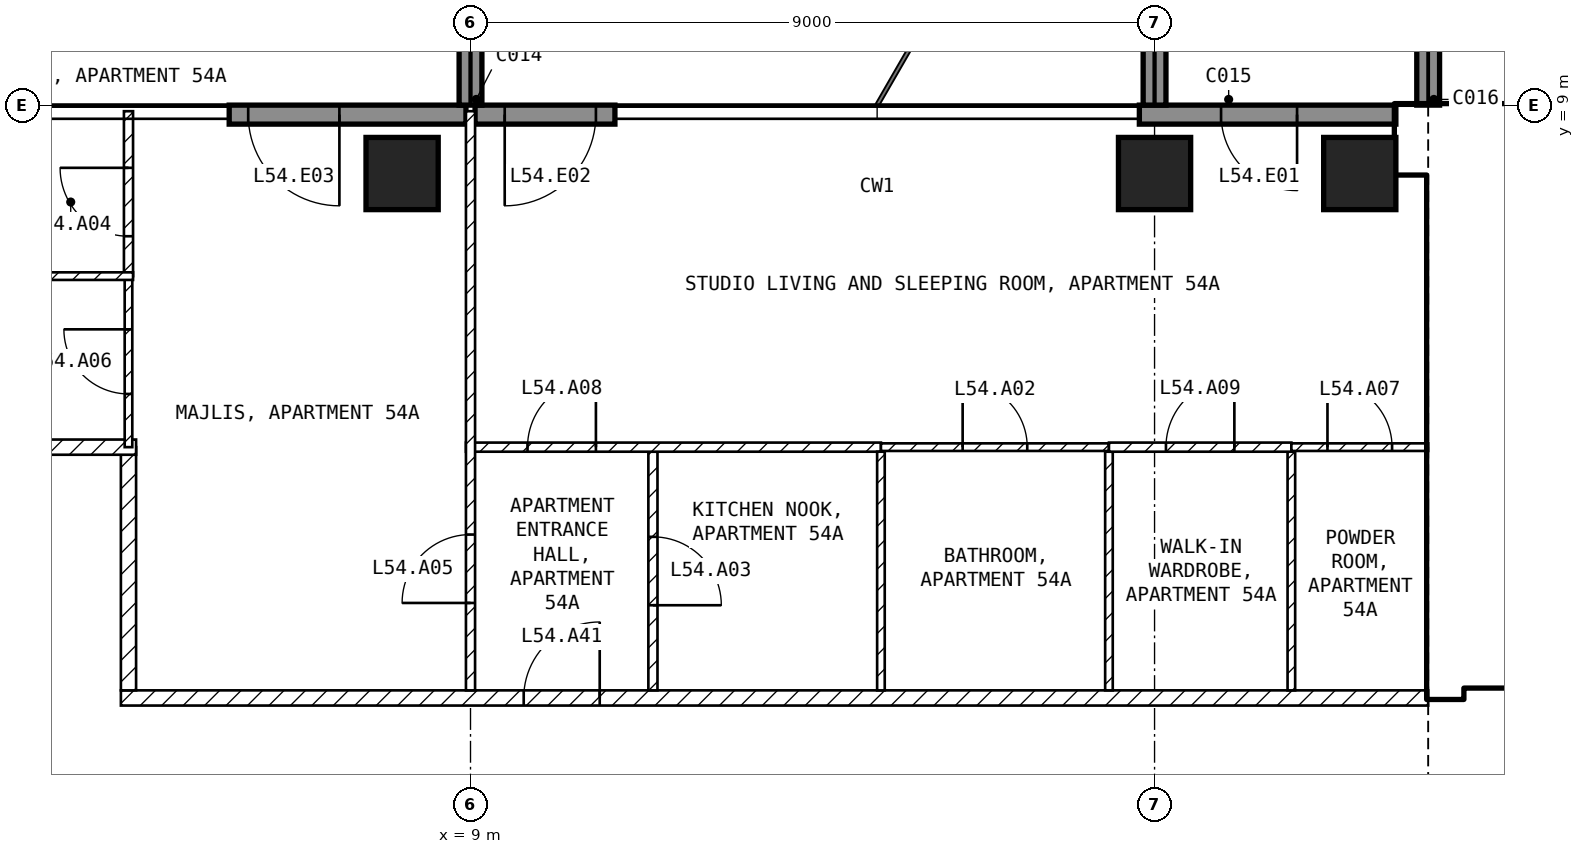
"""IFC4 building model, lengths in metres.
Left out: names, types, materials, properties, quantities, classifications, styles, units other than length and angle.
Written with IfcOpenShell. Run it as: python <this file> out.ifc"""

import sys

from ifc_helpers import new_model, si_unit, direction, frame, frame_2d, origin, origin_2d, place, context, subcontext, project, spatial, rectangle, extrude, element, fill, save


model = new_model("IFC4")
c1 = context("Model", 3, precision=1e-05, world=origin(), true_north=direction((0.0, 1.0)))
c2 = subcontext(c1, "Body", "Model", "MODEL_VIEW")
j1 = project(units=[si_unit("LENGTHUNIT", "METRE"), si_unit("PLANEANGLEUNIT", "RADIAN")], contexts=[c1])
p1 = place(None, origin())
s1 = spatial("IfcSite", under=j1, at=p1, CompositionType="ELEMENT")
p2 = place(p1, origin())
s2 = spatial("IfcBuilding", under=s1, at=p2, CompositionType="ELEMENT")
p3 = place(p2, frame((0.0, 0.0, 215.6)))
s3 = spatial("IfcBuildingStorey", under=s2, at=p3, CompositionType="ELEMENT", Elevation=215.6)
for number, where, z_axis, x_axis in (
    (1, (8.1, 8.1, -0.25), (0.0, 0.0, 1.0), (1.0, 0.0, 0.0)),
    (2, (18.0, 8.1, -0.25), (0.0, 0.0, 1.0), (1.0, 0.0, 0.0)),
    (3, (20.7, 8.1, -0.25), (0.0, 0.0, 1.0), (1.0, 0.0, 0.0)),
):
    element("IfcColumn", number, at=place(p3, frame(where, z_axis=z_axis, x_axis=x_axis)), inside=s3, PredefinedType="COLUMN", context=c2, shape_type="SweptSolid", body=[
        extrude(rectangle(XDim=0.95, YDim=0.95, at=origin_2d()), origin(), (0.0, 0.0, 1.0), 3.5),
    ])
p4 = place(p3, frame((21.175, 8.875, 0.0), z_axis=(0.0, 0.0, 1.0), x_axis=(-1.0, 0.0, 0.0)))
e4 = element("IfcWall", 4, at=p4, inside=s3, PredefinedType="SOLIDWALL", context=c2, shape_type="SweptSolid", body=[
    extrude(rectangle(XDim=3.375, YDim=0.25, at=frame_2d((1.688, 0.0))), origin(), (0.0, 0.0, 1.0), 3.25),
])
p5 = place(p4, frame((1.3, 0.0, 0.0)))
e5 = element("IfcOpeningElement", 5, at=p5, cuts=e4, PredefinedType="OPENING", context=c2, shape_type="SweptSolid", body=[
    extrude(rectangle(XDim=1.0, YDim=2.4, at=frame_2d((0.5, 1.2))), frame((0.0, 0.135, 0.0), z_axis=(0.0, -1.0, 0.0), x_axis=(1.0, 0.0, 0.0)), (0.0, 0.0, 1.0), 0.27),
])
p6 = place(p3, frame((10.9, 8.875, 0.0), z_axis=(0.0, 0.0, 1.0), x_axis=(-1.0, 0.0, 0.0)))
e6 = element("IfcWall", 6, at=p6, inside=s3, PredefinedType="SOLIDWALL", context=c2, shape_type="SweptSolid", body=[
    extrude(rectangle(XDim=1.84, YDim=0.25, at=frame_2d((0.92, 0.0))), origin(), (0.0, 0.0, 1.0), 3.25),
])
p7 = place(p6, frame((0.25, 0.0, 0.0)))
e7 = element("IfcOpeningElement", 7, at=p7, cuts=e6, PredefinedType="OPENING", context=c2, shape_type="SweptSolid", body=[
    extrude(rectangle(XDim=1.2, YDim=2.4, at=frame_2d((0.6, 1.2))), frame((0.0, 0.135, 0.0), z_axis=(0.0, -1.0, 0.0), x_axis=(1.0, 0.0, 0.0)), (0.0, 0.0, 1.0), 0.27),
])
p8 = place(p3, frame((8.94, 8.875, 0.0), z_axis=(0.0, 0.0, 1.0), x_axis=(-1.0, 0.0, 0.0)))
e8 = element("IfcWall", 8, at=p8, inside=s3, PredefinedType="SOLIDWALL", context=c2, shape_type="SweptSolid", body=[
    extrude(rectangle(XDim=3.115, YDim=0.25, at=frame_2d((1.558, 0.0))), origin(), (0.0, 0.0, 1.0), 3.25),
])
p9 = place(p8, frame((1.665, 0.0, 0.0)))
e9 = element("IfcOpeningElement", 9, at=p9, cuts=e8, PredefinedType="OPENING", context=c2, shape_type="SweptSolid", body=[
    extrude(rectangle(XDim=1.2, YDim=2.4, at=frame_2d((0.6, 1.2))), frame((0.0, 0.135, 0.0), z_axis=(0.0, -1.0, 0.0), x_axis=(1.0, 0.0, 0.0)), (0.0, 0.0, 1.0), 0.27),
])
for number, where, z_axis, x_axis in (
    (10, (9.0, 9.0, 0.0), (0.0, 0.0, 1.0), (0.0, 1.0, 0.0)),
    (11, (18.0, 9.0, 0.0), (0.0, 0.0, 1.0), (0.0, 1.0, 0.0)),
    (12, (21.6, 9.0, 0.0), (0.0, 0.0, 1.0), (0.0, 1.0, 0.0)),
):
    element("IfcWall", number, at=place(p3, frame(where, z_axis=z_axis, x_axis=x_axis)), inside=s3, PredefinedType="SOLIDWALL", context=c2, shape_type="SweptSolid", body=[
        extrude(rectangle(XDim=2.7, YDim=0.3, at=frame_2d((1.35, 0.0))), origin(), (0.0, 0.0, 1.0), 3.25),
    ])
p10 = place(p3, frame((21.175, 8.55, 0.0), z_axis=(0.0, 0.0, 1.0), x_axis=(1.0, 0.0, 0.0)))
e13 = element("IfcWall", 13, at=p10, inside=s3, PredefinedType="SHEAR", context=c2, shape_type="SweptSolid", body=[
    extrude(rectangle(XDim=8.425, YDim=0.9, at=frame_2d((4.212, 0.0))), origin(), (0.0, 0.0, 1.0), 3.25),
])
p11 = place(p3, frame((21.825, 1.2, 0.0), z_axis=(0.0, 0.0, 1.0), x_axis=(0.0, 1.0, 0.0)))
e14 = element("IfcWall", 14, at=p11, inside=s3, PredefinedType="SHEAR", context=c2, shape_type="SweptSolid", body=[
    extrude(rectangle(XDim=6.9, YDim=0.45, at=frame_2d((3.45, 0.0))), origin(), (0.0, 0.0, 1.0), 3.25),
])
p12 = place(p3, frame((22.05, 1.45, 0.0), z_axis=(0.0, 0.0, 1.0), x_axis=(1.0, 0.0, 0.0)))
e15 = element("IfcWall", 15, at=p12, inside=s3, PredefinedType="SOLIDWALL", context=c2, shape_type="SweptSolid", body=[
    extrude(rectangle(XDim=11.15, YDim=0.2, at=frame_2d((5.575, 0.0))), origin(), (0.0, 0.0, 1.0), 3.25),
])
p13 = place(p12, frame((0.75, 0.0, 0.0)))
e16 = element("IfcOpeningElement", 16, at=p13, cuts=e15, PredefinedType="OPENING", context=c2, shape_type="SweptSolid", body=[
    extrude(rectangle(XDim=1.0, YDim=2.1, at=frame_2d((0.5, 1.05))), frame((0.0, 0.11, 0.0), z_axis=(0.0, -1.0, 0.0), x_axis=(1.0, 0.0, 0.0)), (0.0, 0.0, 1.0), 0.22),
])
p14 = place(p12, frame((3.25, 0.0, 0.0)))
e17 = element("IfcOpeningElement", 17, at=p14, cuts=e15, PredefinedType="OPENING", context=c2, shape_type="SweptSolid", body=[
    extrude(rectangle(XDim=1.0, YDim=2.1, at=frame_2d((0.5, 1.05))), frame((0.0, 0.11, 0.0), z_axis=(0.0, -1.0, 0.0), x_axis=(1.0, 0.0, 0.0)), (0.0, 0.0, 1.0), 0.22),
])
p15 = place(p12, frame((9.15, 0.0, 0.0)))
e18 = element("IfcOpeningElement", 18, at=p15, cuts=e15, PredefinedType="OPENING", context=c2, shape_type="SweptSolid", body=[
    extrude(rectangle(XDim=0.9, YDim=2.1, at=frame_2d((0.45, 1.05))), frame((0.0, 0.11, 0.0), z_axis=(0.0, -1.0, 0.0), x_axis=(1.0, 0.0, 0.0)), (0.0, 0.0, 1.0), 0.22),
])
p16 = place(p3, frame((22.05, 5.15, 0.0), z_axis=(0.0, 0.0, 1.0), x_axis=(1.0, 0.0, 0.0)))
e19 = element("IfcWall", 19, at=p16, inside=s3, PredefinedType="SOLIDWALL", context=c2, shape_type="SweptSolid", body=[
    extrude(rectangle(XDim=6.3, YDim=0.2, at=frame_2d((3.15, 0.0))), origin(), (0.0, 0.0, 1.0), 3.25),
])
p17 = place(p16, frame((0.2, 0.0, 0.0)))
e20 = element("IfcOpeningElement", 20, at=p17, cuts=e19, PredefinedType="OPENING", context=c2, shape_type="SweptSolid", body=[
    extrude(rectangle(XDim=1.0, YDim=2.1, at=frame_2d((0.5, 1.05))), frame((0.0, 0.11, 0.0), z_axis=(0.0, -1.0, 0.0), x_axis=(1.0, 0.0, 0.0)), (0.0, 0.0, 1.0), 0.22),
])
p18 = place(p3, frame((4.4, 1.2, 0.0), z_axis=(0.0, 0.0, 1.0), x_axis=(1.0, 0.0, 0.0)))
e21 = element("IfcWall", 21, at=p18, inside=s3, PredefinedType="PARTITIONING", context=c2, shape_type="SweptSolid", body=[
    extrude(rectangle(XDim=17.2, YDim=0.2, at=frame_2d((8.6, 0.0))), origin(), (0.0, 0.0, 1.0), 3.25),
])
p19 = place(p18, frame((5.3, 0.0, 0.0)))
e22 = element("IfcOpeningElement", 22, at=p19, cuts=e21, PredefinedType="OPENING", context=c2, shape_type="SweptSolid", body=[
    extrude(rectangle(XDim=1.0, YDim=2.1, at=frame_2d((0.5, 1.05))), frame((0.0, 0.11, 0.0), z_axis=(0.0, -1.0, 0.0), x_axis=(1.0, 0.0, 0.0)), (0.0, 0.0, 1.0), 0.22),
])
p20 = place(p3, frame((4.5, 4.5, 0.0), z_axis=(0.0, 0.0, 1.0), x_axis=(0.0, -1.0, 0.0)))
e23 = element("IfcWall", 23, at=p20, inside=s3, PredefinedType="PARTITIONING", context=c2, shape_type="SweptSolid", body=[
    extrude(rectangle(XDim=3.2, YDim=0.2, at=frame_2d((1.6, 0.0))), origin(), (0.0, 0.0, 1.0), 3.25),
])
p21 = place(p3, frame((1.1, 4.5, 0.0), z_axis=(0.0, 0.0, 1.0), x_axis=(1.0, 0.0, 0.0)))
e24 = element("IfcWall", 24, at=p21, inside=s3, PredefinedType="PARTITIONING", context=c2, shape_type="SweptSolid", body=[
    extrude(rectangle(XDim=3.5, YDim=0.2, at=frame_2d((1.75, 0.0))), origin(), (0.0, 0.0, 1.0), 3.25),
])
p22 = place(p3, frame((11.4, 4.44, 0.0), z_axis=(0.0, 0.0, 1.0), x_axis=(0.0, -1.0, 0.0)))
e25 = element("IfcWall", 25, at=p22, inside=s3, PredefinedType="PARTITIONING", context=c2, shape_type="SweptSolid", body=[
    extrude(rectangle(XDim=3.14, YDim=0.12, at=frame_2d((1.57, 0.0))), origin(), (0.0, 0.0, 1.0), 3.25),
])
p23 = place(p22, frame((1.12, 0.0, 0.0)))
e26 = element("IfcOpeningElement", 26, at=p23, cuts=e25, PredefinedType="OPENING", context=c2, shape_type="SweptSolid", body=[
    extrude(rectangle(XDim=0.9, YDim=2.1, at=frame_2d((0.45, 1.05))), frame((0.0, 0.07, 0.0), z_axis=(0.0, -1.0, 0.0), x_axis=(1.0, 0.0, 0.0)), (0.0, 0.0, 1.0), 0.14),
])
p24 = place(p3, frame((8.94, 4.5, 0.0), z_axis=(0.0, 0.0, 1.0), x_axis=(1.0, 0.0, 0.0)))
e27 = element("IfcWall", 27, at=p24, inside=s3, PredefinedType="PARTITIONING", context=c2, shape_type="SweptSolid", body=[
    extrude(rectangle(XDim=5.46, YDim=0.12, at=frame_2d((2.73, 0.0))), origin(), (0.0, 0.0, 1.0), 3.25),
])
p25 = place(p24, frame((0.81, 0.0, 0.0)))
e28 = element("IfcOpeningElement", 28, at=p25, cuts=e27, PredefinedType="OPENING", context=c2, shape_type="SweptSolid", body=[
    extrude(rectangle(XDim=0.9, YDim=2.1, at=frame_2d((0.45, 1.05))), frame((0.0, 0.07, 0.0), z_axis=(0.0, -1.0, 0.0), x_axis=(1.0, 0.0, 0.0)), (0.0, 0.0, 1.0), 0.14),
])
p26 = place(p3, frame((9.0, 1.3, 0.0), z_axis=(0.0, 0.0, 1.0), x_axis=(0.0, 1.0, 0.0)))
e29 = element("IfcWall", 29, at=p26, inside=s3, PredefinedType="PARTITIONING", context=c2, shape_type="SweptSolid", body=[
    extrude(rectangle(XDim=7.62, YDim=0.12, at=frame_2d((3.81, 0.0))), origin(), (0.0, 0.0, 1.0), 3.25),
])
p27 = place(p26, frame((1.15, 0.0, 0.0)))
e30 = element("IfcOpeningElement", 30, at=p27, cuts=e29, PredefinedType="OPENING", context=c2, shape_type="SweptSolid", body=[
    extrude(rectangle(XDim=0.9, YDim=2.1, at=frame_2d((0.45, 1.05))), frame((0.0, 0.07, 0.0), z_axis=(0.0, -1.0, 0.0), x_axis=(1.0, 0.0, 0.0)), (0.0, 0.0, 1.0), 0.14),
])
for number, where, z_axis, x_axis in (
    (31, (14.4, 4.44, 0.0), (0.0, 0.0, 1.0), (0.0, -1.0, 0.0)),
    (32, (17.4, 4.44, 0.0), (0.0, 0.0, 1.0), (0.0, -1.0, 0.0)),
):
    element("IfcWall", number, at=place(p3, frame(where, z_axis=z_axis, x_axis=x_axis)), inside=s3, PredefinedType="PARTITIONING", context=c2, shape_type="SweptSolid", body=[
        extrude(rectangle(XDim=3.14, YDim=0.1, at=frame_2d((1.57, 0.0))), origin(), (0.0, 0.0, 1.0), 3.25),
    ])
p28 = place(p3, frame((14.4, 4.5, 0.0), z_axis=(0.0, 0.0, 1.0), x_axis=(1.0, 0.0, 0.0)))
e33 = element("IfcWall", 33, at=p28, inside=s3, PredefinedType="PARTITIONING", context=c2, shape_type="SweptSolid", body=[
    extrude(rectangle(XDim=3.0, YDim=0.1, at=frame_2d((1.5, 0.0))), origin(), (0.0, 0.0, 1.0), 3.25),
])
p29 = place(p28, frame((1.075, 0.0, 0.0)))
e34 = element("IfcOpeningElement", 34, at=p29, cuts=e33, PredefinedType="OPENING", context=c2, shape_type="SweptSolid", body=[
    extrude(rectangle(XDim=0.85, YDim=2.1, at=frame_2d((0.425, 1.05))), frame((0.0, 0.06, 0.0), z_axis=(0.0, -1.0, 0.0), x_axis=(1.0, 0.0, 0.0)), (0.0, 0.0, 1.0), 0.12),
])
p30 = place(p3, frame((19.8, 4.44, 0.0), z_axis=(0.0, 0.0, 1.0), x_axis=(0.0, -1.0, 0.0)))
e35 = element("IfcWall", 35, at=p30, inside=s3, PredefinedType="PARTITIONING", context=c2, shape_type="SweptSolid", body=[
    extrude(rectangle(XDim=3.14, YDim=0.1, at=frame_2d((1.57, 0.0))), origin(), (0.0, 0.0, 1.0), 3.25),
])
p31 = place(p3, frame((17.4, 4.5, 0.0), z_axis=(0.0, 0.0, 1.0), x_axis=(1.0, 0.0, 0.0)))
e36 = element("IfcWall", 36, at=p31, inside=s3, PredefinedType="PARTITIONING", context=c2, shape_type="SweptSolid", body=[
    extrude(rectangle(XDim=2.4, YDim=0.12, at=frame_2d((1.2, 0.0))), origin(), (0.0, 0.0, 1.0), 3.25),
])
p32 = place(p31, frame((0.75, 0.0, 0.0)))
e37 = element("IfcOpeningElement", 37, at=p32, cuts=e36, PredefinedType="OPENING", context=c2, shape_type="SweptSolid", body=[
    extrude(rectangle(XDim=0.9, YDim=2.1, at=frame_2d((0.45, 1.05))), frame((0.0, 0.07, 0.0), z_axis=(0.0, -1.0, 0.0), x_axis=(1.0, 0.0, 0.0)), (0.0, 0.0, 1.0), 0.14),
])
p33 = place(p3, frame((19.8, 4.5, 0.0), z_axis=(0.0, 0.0, 1.0), x_axis=(1.0, 0.0, 0.0)))
e38 = element("IfcWall", 38, at=p33, inside=s3, PredefinedType="PARTITIONING", context=c2, shape_type="SweptSolid", body=[
    extrude(rectangle(XDim=1.8, YDim=0.1, at=frame_2d((0.9, 0.0))), origin(), (0.0, 0.0, 1.0), 3.25),
])
p34 = place(p33, frame((0.475, 0.0, 0.0)))
e39 = element("IfcOpeningElement", 39, at=p34, cuts=e38, PredefinedType="OPENING", context=c2, shape_type="SweptSolid", body=[
    extrude(rectangle(XDim=0.85, YDim=2.1, at=frame_2d((0.425, 1.05))), frame((0.0, 0.06, 0.0), z_axis=(0.0, -1.0, 0.0), x_axis=(1.0, 0.0, 0.0)), (0.0, 0.0, 1.0), 0.12),
])
p35 = place(p3, frame((4.5, 4.5, 0.0), z_axis=(0.0, 0.0, 1.0), x_axis=(0.0, 1.0, 0.0)))
e40 = element("IfcWall", 40, at=p35, inside=s3, PredefinedType="PARTITIONING", context=c2, shape_type="SweptSolid", body=[
    extrude(rectangle(XDim=2.25, YDim=0.1, at=frame_2d((1.125, 0.0))), origin(), (0.0, 0.0, 1.0), 3.25),
])
p36 = place(p35, frame((0.7, 0.0, 0.0)))
e41 = element("IfcOpeningElement", 41, at=p36, cuts=e40, PredefinedType="OPENING", context=c2, shape_type="SweptSolid", body=[
    extrude(rectangle(XDim=0.85, YDim=2.1, at=frame_2d((0.425, 1.05))), frame((0.0, 0.06, 0.0), z_axis=(0.0, -1.0, 0.0), x_axis=(1.0, 0.0, 0.0)), (0.0, 0.0, 1.0), 0.12),
])
p37 = place(p3, frame((4.5, 6.75, 0.0), z_axis=(0.0, 0.0, 1.0), x_axis=(0.0, 1.0, 0.0)))
e42 = element("IfcWall", 42, at=p37, inside=s3, PredefinedType="PARTITIONING", context=c2, shape_type="SweptSolid", body=[
    extrude(rectangle(XDim=2.17, YDim=0.12, at=frame_2d((1.085, 0.0))), origin(), (0.0, 0.0, 1.0), 3.25),
])
p38 = place(p37, frame((0.525, 0.0, 0.0)))
e43 = element("IfcOpeningElement", 43, at=p38, cuts=e42, PredefinedType="OPENING", context=c2, shape_type="SweptSolid", body=[
    extrude(rectangle(XDim=0.9, YDim=2.1, at=frame_2d((0.45, 1.05))), frame((0.0, 0.07, 0.0), z_axis=(0.0, -1.0, 0.0), x_axis=(1.0, 0.0, 0.0)), (0.0, 0.0, 1.0), 0.14),
])
p39 = place(p3, frame((1.1, 6.75, 0.0), z_axis=(0.0, 0.0, 1.0), x_axis=(1.0, 0.0, 0.0)))
e44 = element("IfcWall", 44, at=p39, inside=s3, PredefinedType="PARTITIONING", context=c2, shape_type="SweptSolid", body=[
    extrude(rectangle(XDim=3.46, YDim=0.1, at=frame_2d((1.73, 0.0))), origin(), (0.0, 0.0, 1.0), 3.25),
])
p40 = place(p5, origin())
e45 = element("IfcDoor", 45, at=p40, inside=s3, OperationType="SINGLE_SWING_LEFT", PredefinedType="DOOR", context=c2, shape_type="SweptSolid", body=[
    extrude(rectangle(XDim=1.0, YDim=2.4, at=frame_2d((0.5, 1.2))), frame((0.0, 0.025, 0.0), z_axis=(0.0, -1.0, 0.0), x_axis=(1.0, 0.0, 0.0)), (0.0, 0.0, 1.0), 0.05),
])
fill(e5, e45)
p41 = place(p7, origin())
e46 = element("IfcDoor", 46, at=p41, inside=s3, OperationType="SINGLE_SWING_RIGHT", PredefinedType="DOOR", context=c2, shape_type="SweptSolid", body=[
    extrude(rectangle(XDim=1.2, YDim=2.4, at=frame_2d((0.6, 1.2))), frame((0.0, 0.025, 0.0), z_axis=(0.0, -1.0, 0.0), x_axis=(1.0, 0.0, 0.0)), (0.0, 0.0, 1.0), 0.05),
])
fill(e7, e46)
p42 = place(p9, origin())
e47 = element("IfcDoor", 47, at=p42, inside=s3, OperationType="SINGLE_SWING_LEFT", PredefinedType="DOOR", context=c2, shape_type="SweptSolid", body=[
    extrude(rectangle(XDim=1.2, YDim=2.4, at=frame_2d((0.6, 1.2))), frame((0.0, 0.025, 0.0), z_axis=(0.0, -1.0, 0.0), x_axis=(1.0, 0.0, 0.0)), (0.0, 0.0, 1.0), 0.05),
])
fill(e9, e47)
p43 = place(p17, origin())
e48 = element("IfcDoor", 48, at=p43, inside=s3, OperationType="SINGLE_SWING_LEFT", PredefinedType="DOOR", context=c2, shape_type="SweptSolid", body=[
    extrude(rectangle(XDim=1.0, YDim=2.1, at=frame_2d((0.5, 1.05))), frame((0.0, 0.025, 0.0), z_axis=(0.0, -1.0, 0.0), x_axis=(1.0, 0.0, 0.0)), (0.0, 0.0, 1.0), 0.05),
])
fill(e20, e48)
p44 = place(p29, origin())
e49 = element("IfcDoor", 49, at=p44, inside=s3, OperationType="SINGLE_SWING_LEFT", PredefinedType="DOOR", context=c2, shape_type="SweptSolid", body=[
    extrude(rectangle(XDim=0.85, YDim=2.1, at=frame_2d((0.425, 1.05))), frame((0.0, 0.025, 0.0), z_axis=(0.0, -1.0, 0.0), x_axis=(1.0, 0.0, 0.0)), (0.0, 0.0, 1.0), 0.05),
])
fill(e34, e49)
p45 = place(p23, origin())
e50 = element("IfcDoor", 50, at=p45, inside=s3, OperationType="SINGLE_SWING_RIGHT", PredefinedType="DOOR", context=c2, shape_type="SweptSolid", body=[
    extrude(rectangle(XDim=0.9, YDim=2.1, at=frame_2d((0.45, 1.05))), frame((0.0, 0.025, 0.0), z_axis=(0.0, -1.0, 0.0), x_axis=(1.0, 0.0, 0.0)), (0.0, 0.0, 1.0), 0.05),
])
fill(e26, e50)
p46 = place(p38, origin())
e51 = element("IfcDoor", 51, at=p46, inside=s3, OperationType="SINGLE_SWING_RIGHT", PredefinedType="DOOR", context=c2, shape_type="SweptSolid", body=[
    extrude(rectangle(XDim=0.9, YDim=2.1, at=frame_2d((0.45, 1.05))), frame((0.0, 0.025, 0.0), z_axis=(0.0, -1.0, 0.0), x_axis=(1.0, 0.0, 0.0)), (0.0, 0.0, 1.0), 0.05),
])
fill(e43, e51)
p47 = place(p27, origin())
e52 = element("IfcDoor", 52, at=p47, inside=s3, OperationType="SINGLE_SWING_LEFT", PredefinedType="DOOR", context=c2, shape_type="SweptSolid", body=[
    extrude(rectangle(XDim=0.9, YDim=2.1, at=frame_2d((0.45, 1.05))), frame((0.0, 0.025, 0.0), z_axis=(0.0, -1.0, 0.0), x_axis=(1.0, 0.0, 0.0)), (0.0, 0.0, 1.0), 0.05),
])
fill(e30, e52)
p48 = place(p36, origin())
e53 = element("IfcDoor", 53, at=p48, inside=s3, OperationType="SINGLE_SWING_RIGHT", PredefinedType="DOOR", context=c2, shape_type="SweptSolid", body=[
    extrude(rectangle(XDim=0.85, YDim=2.1, at=frame_2d((0.425, 1.05))), frame((0.0, 0.025, 0.0), z_axis=(0.0, -1.0, 0.0), x_axis=(1.0, 0.0, 0.0)), (0.0, 0.0, 1.0), 0.05),
])
fill(e41, e53)
p49 = place(p34, origin())
e54 = element("IfcDoor", 54, at=p49, inside=s3, OperationType="SINGLE_SWING_LEFT", PredefinedType="DOOR", context=c2, shape_type="SweptSolid", body=[
    extrude(rectangle(XDim=0.85, YDim=2.1, at=frame_2d((0.425, 1.05))), frame((0.0, 0.025, 0.0), z_axis=(0.0, -1.0, 0.0), x_axis=(1.0, 0.0, 0.0)), (0.0, 0.0, 1.0), 0.05),
])
fill(e39, e54)
p50 = place(p25, origin())
e55 = element("IfcDoor", 55, at=p50, inside=s3, OperationType="SINGLE_SWING_RIGHT", PredefinedType="DOOR", context=c2, shape_type="SweptSolid", body=[
    extrude(rectangle(XDim=0.9, YDim=2.1, at=frame_2d((0.45, 1.05))), frame((0.0, 0.025, 0.0), z_axis=(0.0, -1.0, 0.0), x_axis=(1.0, 0.0, 0.0)), (0.0, 0.0, 1.0), 0.05),
])
fill(e28, e55)
p51 = place(p32, origin())
e56 = element("IfcDoor", 56, at=p51, inside=s3, OperationType="SINGLE_SWING_RIGHT", PredefinedType="DOOR", context=c2, shape_type="SweptSolid", body=[
    extrude(rectangle(XDim=0.9, YDim=2.1, at=frame_2d((0.45, 1.05))), frame((0.0, 0.025, 0.0), z_axis=(0.0, -1.0, 0.0), x_axis=(1.0, 0.0, 0.0)), (0.0, 0.0, 1.0), 0.05),
])
fill(e37, e56)
p52 = place(p19, origin())
e57 = element("IfcDoor", 57, at=p52, inside=s3, OperationType="SINGLE_SWING_RIGHT", PredefinedType="DOOR", context=c2, shape_type="SweptSolid", body=[
    extrude(rectangle(XDim=1.0, YDim=2.1, at=frame_2d((0.5, 1.05))), frame((0.0, 0.025, 0.0), z_axis=(0.0, -1.0, 0.0), x_axis=(1.0, 0.0, 0.0)), (0.0, 0.0, 1.0), 0.05),
])
fill(e22, e57)
save(model, sys.argv[1])
